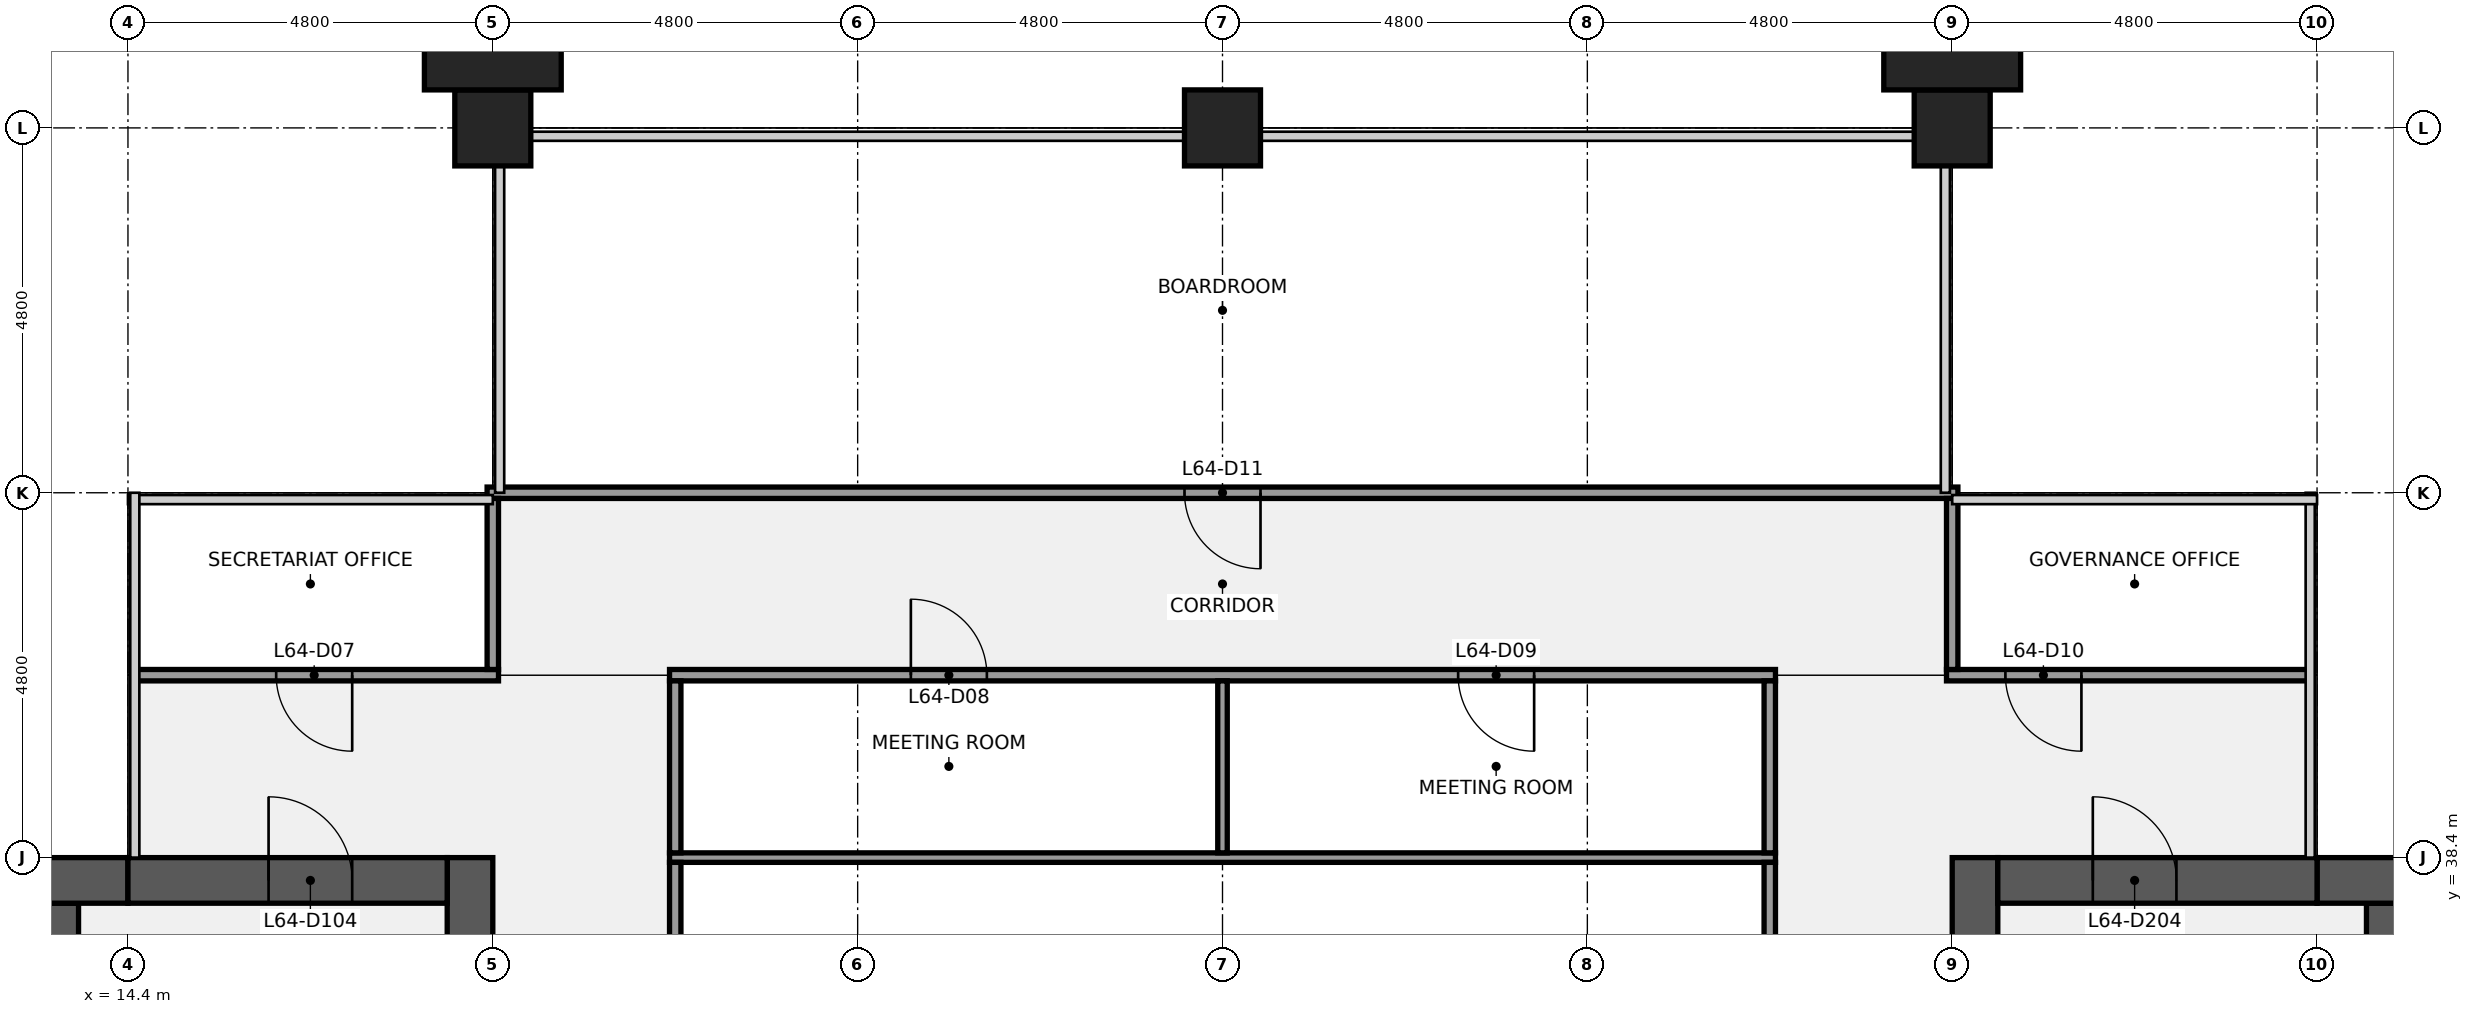
"""IFC4 building model, lengths in metres.
Left out: names, types, materials, properties, quantities, classifications, styles, units other than length and angle.
Written with IfcOpenShell. Run it as: python <this file> out.ifc"""

import sys

from ifc_helpers import new_model, si_unit, direction, frame, frame_2d, origin, origin_2d, place, context, subcontext, project, spatial, rectangle, extrude, element, fill, save


model = new_model("IFC4")
c1 = context("Model", 3, precision=1e-05, world=origin(), true_north=direction((0.0, 1.0)))
c2 = subcontext(c1, "Body", "Model", "MODEL_VIEW")
j1 = project(units=[si_unit("LENGTHUNIT", "METRE"), si_unit("PLANEANGLEUNIT", "RADIAN")], contexts=[c1])
p1 = place(None, origin())
s1 = spatial("IfcSite", under=j1, at=p1, CompositionType="ELEMENT")
p2 = place(p1, origin())
s2 = spatial("IfcBuilding", under=s1, at=p2, CompositionType="ELEMENT")
p3 = place(p2, frame((0.0, 0.0, 294.3)))
s3 = spatial("IfcBuildingStorey", under=s2, at=p3, CompositionType="ELEMENT", Elevation=294.3)
for number, where, z_axis, x_axis in (
    (1, (19.2, 48.0, 0.0), (0.0, 0.0, 1.0), (1.0, 0.0, 0.0)),
    (2, (28.8, 48.0, 0.0), (0.0, 0.0, 1.0), (1.0, 0.0, 0.0)),
    (3, (38.4, 48.0, 0.0), (0.0, 0.0, 1.0), (1.0, 0.0, 0.0)),
):
    element("IfcColumn", number, at=place(p3, frame(where, z_axis=z_axis, x_axis=x_axis)), inside=s3, PredefinedType="COLUMN", context=c2, shape_type="SweptSolid", body=[
        extrude(rectangle(XDim=1.0, YDim=1.0, at=origin_2d()), origin(), (0.0, 0.0, 1.0), 4.0),
    ])
p4 = place(p3, frame((18.9, 38.4, 0.0), z_axis=(0.0, 0.0, 1.0), x_axis=(0.0, -1.0, 0.0)))
e4 = element("IfcWall", 4, at=p4, inside=s3, PredefinedType="SHEAR", context=c2, shape_type="SweptSolid", body=[
    extrude(rectangle(XDim=28.8, YDim=0.6, at=frame_2d((14.4, 0.0))), origin(), (0.0, 0.0, 1.0), 3.84),
])
p5 = place(p4, frame((18.3, 0.0, 0.0)))
e5 = element("IfcOpeningElement", 5, at=p5, cuts=e4, PredefinedType="OPENING", context=c2, shape_type="SweptSolid", body=[
    extrude(rectangle(XDim=1.8, YDim=2.1, at=frame_2d((0.9, 1.05))), frame((0.0, 0.31, 0.0), z_axis=(0.0, -1.0, 0.0), x_axis=(1.0, 0.0, 0.0)), (0.0, 0.0, 1.0), 0.62),
])
p6 = place(p4, frame((8.7, 0.0, 0.0)))
e6 = element("IfcOpeningElement", 6, at=p6, cuts=e4, PredefinedType="OPENING", context=c2, shape_type="SweptSolid", body=[
    extrude(rectangle(XDim=1.8, YDim=2.1, at=frame_2d((0.9, 1.05))), frame((0.0, 0.31, 0.0), z_axis=(0.0, -1.0, 0.0), x_axis=(1.0, 0.0, 0.0)), (0.0, 0.0, 1.0), 0.62),
])
p7 = place(p3, frame((6.25, 37.5, 0.0), z_axis=(0.0, 0.0, 1.0), x_axis=(1.0, 0.0, 0.0)))
e7 = element("IfcWall", 7, at=p7, inside=s3, PredefinedType="SHEAR", context=c2, shape_type="SweptSolid", body=[
    extrude(rectangle(XDim=7.5, YDim=0.6, at=frame_2d((3.75, 0.0))), origin(), (0.0, 0.0, 1.0), 3.84),
])
p8 = place(p3, frame((0.6, 38.1, 0.0), z_axis=(0.0, 0.0, 1.0), x_axis=(1.0, 0.0, 0.0)))
e8 = element("IfcWall", 8, at=p8, inside=s3, PredefinedType="SHEAR", context=c2, shape_type="SweptSolid", body=[
    extrude(rectangle(XDim=13.8, YDim=0.6, at=frame_2d((6.9, 0.0))), origin(), (0.0, 0.0, 1.0), 3.84),
])
p9 = place(p8, frame((5.7, 0.0, 0.9)))
e9 = element("IfcOpeningElement", 9, at=p9, cuts=e8, PredefinedType="OPENING", context=c2, shape_type="SweptSolid", body=[
    extrude(rectangle(XDim=1.8, YDim=1.5, at=frame_2d((0.9, 0.75))), frame((0.0, 0.31, 0.0), z_axis=(0.0, -1.0, 0.0), x_axis=(1.0, 0.0, 0.0)), (0.0, 0.0, 1.0), 0.62),
])
p10 = place(p8, frame((10.5, 0.0, 0.9)))
e10 = element("IfcOpeningElement", 10, at=p10, cuts=e8, PredefinedType="OPENING", context=c2, shape_type="SweptSolid", body=[
    extrude(rectangle(XDim=1.8, YDim=1.5, at=frame_2d((0.9, 0.75))), frame((0.0, 0.31, 0.0), z_axis=(0.0, -1.0, 0.0), x_axis=(1.0, 0.0, 0.0)), (0.0, 0.0, 1.0), 0.62),
])
p11 = place(p3, frame((14.4, 38.1, 0.0), z_axis=(0.0, 0.0, 1.0), x_axis=(1.0, 0.0, 0.0)))
e11 = element("IfcWall", 11, at=p11, inside=s3, PredefinedType="SHEAR", context=c2, shape_type="SweptSolid", body=[
    extrude(rectangle(XDim=4.2, YDim=0.6, at=frame_2d((2.1, 0.0))), origin(), (0.0, 0.0, 1.0), 3.84),
])
p12 = place(p11, frame((1.85, 0.0, 0.0)))
e12 = element("IfcOpeningElement", 12, at=p12, cuts=e11, PredefinedType="OPENING", context=c2, shape_type="SweptSolid", body=[
    extrude(rectangle(XDim=1.1, YDim=2.1, at=frame_2d((0.55, 1.05))), frame((0.0, 0.31, 0.0), z_axis=(0.0, -1.0, 0.0), x_axis=(1.0, 0.0, 0.0)), (0.0, 0.0, 1.0), 0.62),
])
p13 = place(p3, frame((38.7, 9.6, 0.0), z_axis=(0.0, 0.0, 1.0), x_axis=(0.0, 1.0, 0.0)))
e13 = element("IfcWall", 13, at=p13, inside=s3, PredefinedType="SHEAR", context=c2, shape_type="SweptSolid", body=[
    extrude(rectangle(XDim=28.8, YDim=0.6, at=frame_2d((14.4, 0.0))), origin(), (0.0, 0.0, 1.0), 3.84),
])
p14 = place(p13, frame((8.7, 0.0, 0.0)))
e14 = element("IfcOpeningElement", 14, at=p14, cuts=e13, PredefinedType="OPENING", context=c2, shape_type="SweptSolid", body=[
    extrude(rectangle(XDim=1.8, YDim=2.1, at=frame_2d((0.9, 1.05))), frame((0.0, 0.31, 0.0), z_axis=(0.0, -1.0, 0.0), x_axis=(1.0, 0.0, 0.0)), (0.0, 0.0, 1.0), 0.62),
])
p15 = place(p13, frame((18.3, 0.0, 0.0)))
e15 = element("IfcOpeningElement", 15, at=p15, cuts=e13, PredefinedType="OPENING", context=c2, shape_type="SweptSolid", body=[
    extrude(rectangle(XDim=1.8, YDim=2.1, at=frame_2d((0.9, 1.05))), frame((0.0, 0.31, 0.0), z_axis=(0.0, -1.0, 0.0), x_axis=(1.0, 0.0, 0.0)), (0.0, 0.0, 1.0), 0.62),
])
p16 = place(p3, frame((43.85, 37.5, 0.0), z_axis=(0.0, 0.0, 1.0), x_axis=(1.0, 0.0, 0.0)))
e16 = element("IfcWall", 16, at=p16, inside=s3, PredefinedType="SHEAR", context=c2, shape_type="SweptSolid", body=[
    extrude(rectangle(XDim=7.5, YDim=0.6, at=frame_2d((3.75, 0.0))), origin(), (0.0, 0.0, 1.0), 3.84),
])
p17 = place(p3, frame((43.2, 38.1, 0.0), z_axis=(0.0, 0.0, 1.0), x_axis=(1.0, 0.0, 0.0)))
e17 = element("IfcWall", 17, at=p17, inside=s3, PredefinedType="SHEAR", context=c2, shape_type="SweptSolid", body=[
    extrude(rectangle(XDim=13.8, YDim=0.6, at=frame_2d((6.9, 0.0))), origin(), (0.0, 0.0, 1.0), 3.84),
])
p18 = place(p17, frame((6.3, 0.0, 0.9)))
e18 = element("IfcOpeningElement", 18, at=p18, cuts=e17, PredefinedType="OPENING", context=c2, shape_type="SweptSolid", body=[
    extrude(rectangle(XDim=1.8, YDim=1.5, at=frame_2d((0.9, 0.75))), frame((0.0, 0.31, 0.0), z_axis=(0.0, -1.0, 0.0), x_axis=(1.0, 0.0, 0.0)), (0.0, 0.0, 1.0), 0.62),
])
p19 = place(p17, frame((1.5, 0.0, 0.9)))
e19 = element("IfcOpeningElement", 19, at=p19, cuts=e17, PredefinedType="OPENING", context=c2, shape_type="SweptSolid", body=[
    extrude(rectangle(XDim=1.8, YDim=1.5, at=frame_2d((0.9, 0.75))), frame((0.0, 0.31, 0.0), z_axis=(0.0, -1.0, 0.0), x_axis=(1.0, 0.0, 0.0)), (0.0, 0.0, 1.0), 0.62),
])
p20 = place(p3, frame((39.0, 38.1, 0.0), z_axis=(0.0, 0.0, 1.0), x_axis=(1.0, 0.0, 0.0)))
e20 = element("IfcWall", 20, at=p20, inside=s3, PredefinedType="SHEAR", context=c2, shape_type="SweptSolid", body=[
    extrude(rectangle(XDim=4.2, YDim=0.6, at=frame_2d((2.1, 0.0))), origin(), (0.0, 0.0, 1.0), 3.84),
])
p21 = place(p20, frame((1.25, 0.0, 0.0)))
e21 = element("IfcOpeningElement", 21, at=p21, cuts=e20, PredefinedType="OPENING", context=c2, shape_type="SweptSolid", body=[
    extrude(rectangle(XDim=1.1, YDim=2.1, at=frame_2d((0.55, 1.05))), frame((0.0, 0.31, 0.0), z_axis=(0.0, -1.0, 0.0), x_axis=(1.0, 0.0, 0.0)), (0.0, 0.0, 1.0), 0.62),
])
p22 = place(p3, frame((21.525, 38.4, 0.0), z_axis=(0.0, 0.0, 1.0), x_axis=(1.0, 0.0, 0.0)))
e22 = element("IfcWall", 22, at=p22, inside=s3, PredefinedType="PARTITIONING", context=c2, shape_type="SweptSolid", body=[
    extrude(rectangle(XDim=14.55, YDim=0.125, at=frame_2d((7.275, 0.0))), origin(), (0.0, 0.0, 1.0), 2.87),
])
p23 = place(p3, frame((14.5, 40.8, 0.0), z_axis=(0.0, 0.0, 1.0), x_axis=(1.0, 0.0, 0.0)))
e23 = element("IfcWall", 23, at=p23, inside=s3, PredefinedType="PARTITIONING", context=c2, shape_type="SweptSolid", body=[
    extrude(rectangle(XDim=4.775, YDim=0.15, at=frame_2d((2.387, 0.0))), origin(), (0.0, 0.0, 1.0), 2.87),
])
p24 = place(p23, frame((1.85, 0.0, 0.0)))
e24 = element("IfcOpeningElement", 24, at=p24, cuts=e23, PredefinedType="OPENING", context=c2, shape_type="SweptSolid", body=[
    extrude(rectangle(XDim=1.0, YDim=2.1, at=frame_2d((0.5, 1.05))), frame((0.0, 0.085, 0.0), z_axis=(0.0, -1.0, 0.0), x_axis=(1.0, 0.0, 0.0)), (0.0, 0.0, 1.0), 0.17),
])
p25 = place(p3, frame((21.525, 40.8, 0.0), z_axis=(0.0, 0.0, 1.0), x_axis=(1.0, 0.0, 0.0)))
e25 = element("IfcWall", 25, at=p25, inside=s3, PredefinedType="PARTITIONING", context=c2, shape_type="SweptSolid", body=[
    extrude(rectangle(XDim=14.55, YDim=0.15, at=frame_2d((7.275, 0.0))), origin(), (0.0, 0.0, 1.0), 2.87),
])
p26 = place(p25, frame((3.175, 0.0, 0.0)))
e26 = element("IfcOpeningElement", 26, at=p26, cuts=e25, PredefinedType="OPENING", context=c2, shape_type="SweptSolid", body=[
    extrude(rectangle(XDim=1.0, YDim=2.1, at=frame_2d((0.5, 1.05))), frame((0.0, 0.085, 0.0), z_axis=(0.0, -1.0, 0.0), x_axis=(1.0, 0.0, 0.0)), (0.0, 0.0, 1.0), 0.17),
])
p27 = place(p25, frame((10.375, 0.0, 0.0)))
e27 = element("IfcOpeningElement", 27, at=p27, cuts=e25, PredefinedType="OPENING", context=c2, shape_type="SweptSolid", body=[
    extrude(rectangle(XDim=1.0, YDim=2.1, at=frame_2d((0.5, 1.05))), frame((0.0, 0.085, 0.0), z_axis=(0.0, -1.0, 0.0), x_axis=(1.0, 0.0, 0.0)), (0.0, 0.0, 1.0), 0.17),
])
p28 = place(p3, frame((38.325, 40.8, 0.0), z_axis=(0.0, 0.0, 1.0), x_axis=(1.0, 0.0, 0.0)))
e28 = element("IfcWall", 28, at=p28, inside=s3, PredefinedType="PARTITIONING", context=c2, shape_type="SweptSolid", body=[
    extrude(rectangle(XDim=4.775, YDim=0.15, at=frame_2d((2.388, 0.0))), origin(), (0.0, 0.0, 1.0), 2.87),
])
p29 = place(p28, frame((0.775, 0.0, 0.0)))
e29 = element("IfcOpeningElement", 29, at=p29, cuts=e28, PredefinedType="OPENING", context=c2, shape_type="SweptSolid", body=[
    extrude(rectangle(XDim=1.0, YDim=2.1, at=frame_2d((0.5, 1.05))), frame((0.0, 0.085, 0.0), z_axis=(0.0, -1.0, 0.0), x_axis=(1.0, 0.0, 0.0)), (0.0, 0.0, 1.0), 0.17),
])
p30 = place(p3, frame((19.125, 43.2, 0.0), z_axis=(0.0, 0.0, 1.0), x_axis=(1.0, 0.0, 0.0)))
e30 = element("IfcWall", 30, at=p30, inside=s3, PredefinedType="PARTITIONING", context=c2, shape_type="SweptSolid", body=[
    extrude(rectangle(XDim=19.35, YDim=0.15, at=frame_2d((9.675, 0.0))), origin(), (0.0, 0.0, 1.0), 2.87),
])
p31 = place(p30, frame((9.175, 0.0, 0.0)))
e31 = element("IfcOpeningElement", 31, at=p31, cuts=e30, PredefinedType="OPENING", context=c2, shape_type="SweptSolid", body=[
    extrude(rectangle(XDim=1.0, YDim=2.1, at=frame_2d((0.5, 1.05))), frame((0.0, 0.085, 0.0), z_axis=(0.0, -1.0, 0.0), x_axis=(1.0, 0.0, 0.0)), (0.0, 0.0, 1.0), 0.17),
])
p32 = place(p3, frame((19.2, 40.875, 0.0), z_axis=(0.0, 0.0, 1.0), x_axis=(0.0, 1.0, 0.0)))
e32 = element("IfcWall", 32, at=p32, inside=s3, PredefinedType="PARTITIONING", context=c2, shape_type="SweptSolid", body=[
    extrude(rectangle(XDim=2.25, YDim=0.15, at=frame_2d((1.125, 0.0))), origin(), (0.0, 0.0, 1.0), 2.87),
])
p33 = place(p3, frame((21.6, 28.863, 0.0), z_axis=(0.0, 0.0, 1.0), x_axis=(0.0, 1.0, 0.0)))
e33 = element("IfcWall", 33, at=p33, inside=s3, PredefinedType="PARTITIONING", context=c2, shape_type="SweptSolid", body=[
    extrude(rectangle(XDim=9.475, YDim=0.15, at=frame_2d((4.737, 0.0))), origin(), (0.0, 0.0, 1.0), 2.87),
])
p34 = place(p33, frame((4.238, 0.0, 0.0)))
e34 = element("IfcOpeningElement", 34, at=p34, cuts=e33, PredefinedType="OPENING", context=c2, shape_type="SweptSolid", body=[
    extrude(rectangle(XDim=1.0, YDim=2.1, at=frame_2d((0.5, 1.05))), frame((0.0, 0.085, 0.0), z_axis=(0.0, -1.0, 0.0), x_axis=(1.0, 0.0, 0.0)), (0.0, 0.0, 1.0), 0.17),
])
p35 = place(p3, frame((21.6, 38.462, 0.0), z_axis=(0.0, 0.0, 1.0), x_axis=(0.0, 1.0, 0.0)))
e35 = element("IfcWall", 35, at=p35, inside=s3, PredefinedType="PARTITIONING", context=c2, shape_type="SweptSolid", body=[
    extrude(rectangle(XDim=2.263, YDim=0.15, at=frame_2d((1.131, 0.0))), origin(), (0.0, 0.0, 1.0), 2.87),
])
p36 = place(p3, frame((28.8, 38.462, 0.0), z_axis=(0.0, 0.0, 1.0), x_axis=(0.0, 1.0, 0.0)))
e36 = element("IfcWall", 36, at=p36, inside=s3, PredefinedType="PARTITIONING", context=c2, shape_type="SweptSolid", body=[
    extrude(rectangle(XDim=2.263, YDim=0.125, at=frame_2d((1.131, 0.0))), origin(), (0.0, 0.0, 1.0), 2.87),
])
p37 = place(p3, frame((36.0, 28.863, 0.0), z_axis=(0.0, 0.0, 1.0), x_axis=(0.0, 1.0, 0.0)))
e37 = element("IfcWall", 37, at=p37, inside=s3, PredefinedType="PARTITIONING", context=c2, shape_type="SweptSolid", body=[
    extrude(rectangle(XDim=9.475, YDim=0.15, at=frame_2d((4.737, 0.0))), origin(), (0.0, 0.0, 1.0), 2.87),
])
p38 = place(p3, frame((36.0, 38.462, 0.0), z_axis=(0.0, 0.0, 1.0), x_axis=(0.0, 1.0, 0.0)))
e38 = element("IfcWall", 38, at=p38, inside=s3, PredefinedType="PARTITIONING", context=c2, shape_type="SweptSolid", body=[
    extrude(rectangle(XDim=2.263, YDim=0.15, at=frame_2d((1.131, 0.0))), origin(), (0.0, 0.0, 1.0), 2.87),
])
p39 = place(p3, frame((38.4, 40.875, 0.0), z_axis=(0.0, 0.0, 1.0), x_axis=(0.0, 1.0, 0.0)))
e39 = element("IfcWall", 39, at=p39, inside=s3, PredefinedType="PARTITIONING", context=c2, shape_type="SweptSolid", body=[
    extrude(rectangle(XDim=2.25, YDim=0.15, at=frame_2d((1.125, 0.0))), origin(), (0.0, 0.0, 1.0), 2.87),
])
for number, where, z_axis, x_axis in (
    (40, (19.2, 49.0, 0.0), (0.0, 0.0, 1.0), (1.0, 0.0, 0.0)),
    (41, (38.4, 49.0, 0.0), (0.0, 0.0, 1.0), (1.0, 0.0, 0.0)),
):
    element("IfcColumn", number, at=place(p3, frame(where, z_axis=z_axis, x_axis=x_axis)), inside=s3, PredefinedType="PILASTER", context=c2, shape_type="SweptSolid", body=[
        extrude(rectangle(XDim=1.8, YDim=1.0, at=origin_2d()), origin(), (0.0, 0.0, 1.0), 4.0),
    ])
p40 = place(p12, origin())
e42 = element("IfcDoor", 42, at=p40, inside=s3, OperationType="SINGLE_SWING_LEFT", PredefinedType="DOOR", context=c2, shape_type="SweptSolid", body=[
    extrude(rectangle(XDim=1.1, YDim=2.1, at=frame_2d((0.55, 1.05))), frame((0.0, 0.025, 0.0), z_axis=(0.0, -1.0, 0.0), x_axis=(1.0, 0.0, 0.0)), (0.0, 0.0, 1.0), 0.05),
])
fill(e12, e42)
p41 = place(p21, origin())
e43 = element("IfcDoor", 43, at=p41, inside=s3, OperationType="SINGLE_SWING_LEFT", PredefinedType="DOOR", context=c2, shape_type="SweptSolid", body=[
    extrude(rectangle(XDim=1.1, YDim=2.1, at=frame_2d((0.55, 1.05))), frame((0.0, 0.025, 0.0), z_axis=(0.0, -1.0, 0.0), x_axis=(1.0, 0.0, 0.0)), (0.0, 0.0, 1.0), 0.05),
])
fill(e21, e43)
p42 = place(p24, origin())
e44 = element("IfcDoor", 44, at=p42, inside=s3, OperationType="SINGLE_SWING_RIGHT", PredefinedType="DOOR", context=c2, shape_type="SweptSolid", body=[
    extrude(rectangle(XDim=1.0, YDim=2.1, at=frame_2d((0.5, 1.05))), frame((0.0, 0.025, 0.0), z_axis=(0.0, -1.0, 0.0), x_axis=(1.0, 0.0, 0.0)), (0.0, 0.0, 1.0), 0.05),
])
fill(e24, e44)
p43 = place(p26, origin())
e45 = element("IfcDoor", 45, at=p43, inside=s3, OperationType="SINGLE_SWING_LEFT", PredefinedType="DOOR", context=c2, shape_type="SweptSolid", body=[
    extrude(rectangle(XDim=1.0, YDim=2.1, at=frame_2d((0.5, 1.05))), frame((0.0, 0.025, 0.0), z_axis=(0.0, -1.0, 0.0), x_axis=(1.0, 0.0, 0.0)), (0.0, 0.0, 1.0), 0.05),
])
fill(e26, e45)
p44 = place(p27, origin())
e46 = element("IfcDoor", 46, at=p44, inside=s3, OperationType="SINGLE_SWING_RIGHT", PredefinedType="DOOR", context=c2, shape_type="SweptSolid", body=[
    extrude(rectangle(XDim=1.0, YDim=2.1, at=frame_2d((0.5, 1.05))), frame((0.0, 0.025, 0.0), z_axis=(0.0, -1.0, 0.0), x_axis=(1.0, 0.0, 0.0)), (0.0, 0.0, 1.0), 0.05),
])
fill(e27, e46)
p45 = place(p29, origin())
e47 = element("IfcDoor", 47, at=p45, inside=s3, OperationType="SINGLE_SWING_RIGHT", PredefinedType="DOOR", context=c2, shape_type="SweptSolid", body=[
    extrude(rectangle(XDim=1.0, YDim=2.1, at=frame_2d((0.5, 1.05))), frame((0.0, 0.025, 0.0), z_axis=(0.0, -1.0, 0.0), x_axis=(1.0, 0.0, 0.0)), (0.0, 0.0, 1.0), 0.05),
])
fill(e29, e47)
p46 = place(p31, origin())
e48 = element("IfcDoor", 48, at=p46, inside=s3, OperationType="SINGLE_SWING_RIGHT", PredefinedType="DOOR", context=c2, shape_type="SweptSolid", body=[
    extrude(rectangle(XDim=1.0, YDim=2.1, at=frame_2d((0.5, 1.05))), frame((0.0, 0.025, 0.0), z_axis=(0.0, -1.0, 0.0), x_axis=(1.0, 0.0, 0.0)), (0.0, 0.0, 1.0), 0.05),
])
fill(e31, e48)
save(model, sys.argv[1])
